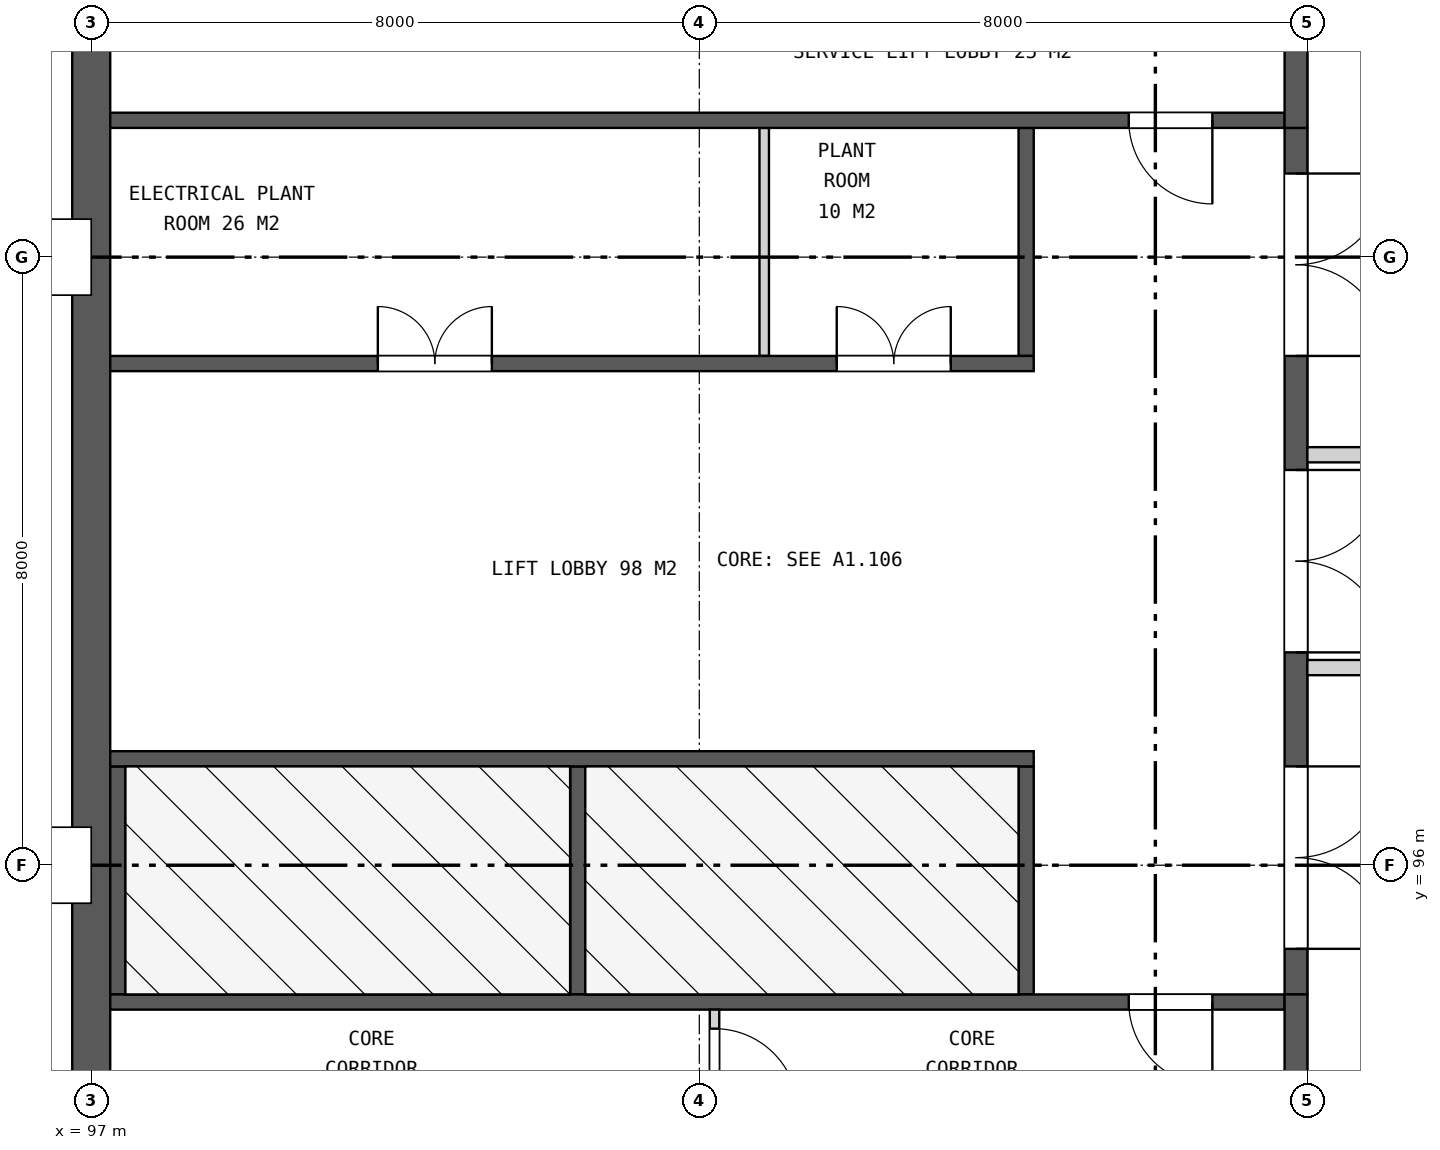
"""IFC4 building model, lengths in metres.
Left out: names, types, materials, properties, quantities, classifications, styles, units other than length and angle.
Written with IfcOpenShell. Run it as: python <this file> out.ifc"""

import sys

from ifc_helpers import new_model, si_unit, direction, frame, frame_2d, origin, place, context, subcontext, project, spatial, rectangle, extrude, element, fill, save


model = new_model("IFC4")
c1 = context("Model", 3, precision=1e-05, world=origin(), true_north=direction((0.0, 1.0)))
c2 = subcontext(c1, "Body", "Model", "MODEL_VIEW")
j1 = project(units=[si_unit("LENGTHUNIT", "METRE"), si_unit("PLANEANGLEUNIT", "RADIAN")], contexts=[c1])
p1 = place(None, origin())
s1 = spatial("IfcSite", under=j1, at=p1, CompositionType="ELEMENT")
p2 = place(p1, origin())
s2 = spatial("IfcBuilding", under=s1, at=p2, CompositionType="ELEMENT")
p3 = place(p2, frame((0.0, 0.0, 303.9)))
s3 = spatial("IfcBuildingStorey", under=s2, at=p3, CompositionType="ELEMENT", Elevation=303.9)
p4 = place(p3, frame((97.0, 111.75, 0.0), z_axis=(0.0, 0.0, 1.0), x_axis=(0.0, -1.0, 0.0)))
e1 = element("IfcWall", 1, at=p4, inside=s3, PredefinedType="SHEAR", context=c2, shape_type="SweptSolid", body=[
    extrude(rectangle(XDim=23.5, YDim=0.5, at=frame_2d((11.75, 0.0))), origin(), (0.0, 0.0, 1.0), 7.4),
])
p5 = place(p3, frame((112.85, 105.7, 0.0), z_axis=(0.0, 0.0, 1.0), x_axis=(0.0, -1.0, 0.0)))
e2 = element("IfcWall", 2, at=p5, inside=s3, PredefinedType="SHEAR", context=c2, shape_type="SweptSolid", body=[
    extrude(rectangle(XDim=11.4, YDim=0.3, at=frame_2d((5.7, 0.0))), origin(), (0.0, 0.0, 1.0), 7.4),
])
p6 = place(p5, frame((0.6, 0.0, 0.0)))
e3 = element("IfcOpeningElement", 3, at=p6, cuts=e2, PredefinedType="OPENING", context=c2, shape_type="SweptSolid", body=[
    extrude(rectangle(XDim=2.4, YDim=2.4, at=frame_2d((1.2, 1.2))), frame((0.0, 0.16, 0.0), z_axis=(0.0, -1.0, 0.0), x_axis=(1.0, 0.0, 0.0)), (0.0, 0.0, 1.0), 0.32),
])
p7 = place(p5, frame((4.5, 0.0, 0.0)))
e4 = element("IfcOpeningElement", 4, at=p7, cuts=e2, PredefinedType="OPENING", context=c2, shape_type="SweptSolid", body=[
    extrude(rectangle(XDim=2.4, YDim=2.4, at=frame_2d((1.2, 1.2))), frame((0.0, 0.16, 0.0), z_axis=(0.0, -1.0, 0.0), x_axis=(1.0, 0.0, 0.0)), (0.0, 0.0, 1.0), 0.32),
])
p8 = place(p5, frame((8.4, 0.0, 0.0)))
e5 = element("IfcOpeningElement", 5, at=p8, cuts=e2, PredefinedType="OPENING", context=c2, shape_type="SweptSolid", body=[
    extrude(rectangle(XDim=2.4, YDim=2.4, at=frame_2d((1.2, 1.2))), frame((0.0, 0.16, 0.0), z_axis=(0.0, -1.0, 0.0), x_axis=(1.0, 0.0, 0.0)), (0.0, 0.0, 1.0), 0.32),
])
for number, where, z_axis, x_axis in (
    (6, (109.3, 97.3, 0.0), (0.0, 0.0, 1.0), (0.0, -1.0, 0.0)),
    (7, (103.4, 97.3, 0.0), (0.0, 0.0, 1.0), (0.0, -1.0, 0.0)),
    (8, (97.35, 97.3, 0.0), (0.0, 0.0, 1.0), (0.0, -1.0, 0.0)),
):
    element("IfcWall", number, at=place(p3, frame(where, z_axis=z_axis, x_axis=x_axis)), inside=s3, PredefinedType="SHEAR", context=c2, shape_type="SweptSolid", body=[
        extrude(rectangle(XDim=3.0, YDim=0.2, at=frame_2d((1.5, 0.0))), origin(), (0.0, 0.0, 1.0), 7.4),
    ])
p9 = place(p3, frame((109.4, 97.4, 0.0), z_axis=(0.0, 0.0, 1.0), x_axis=(-1.0, 0.0, 0.0)))
e9 = element("IfcWall", 9, at=p9, inside=s3, PredefinedType="SHEAR", context=c2, shape_type="SweptSolid", body=[
    extrude(rectangle(XDim=12.15, YDim=0.2, at=frame_2d((6.075, 0.0))), origin(), (0.0, 0.0, 1.0), 7.4),
])
p10 = place(p3, frame((109.3, 105.7, 0.0), z_axis=(0.0, 0.0, 1.0), x_axis=(0.0, -1.0, 0.0)))
e10 = element("IfcWall", 10, at=p10, inside=s3, PredefinedType="SHEAR", context=c2, shape_type="SweptSolid", body=[
    extrude(rectangle(XDim=3.0, YDim=0.2, at=frame_2d((1.5, 0.0))), origin(), (0.0, 0.0, 1.0), 7.4),
])
p11 = place(p3, frame((105.854, 105.7, 0.0), z_axis=(0.0, 0.0, 1.0), x_axis=(0.0, -1.0, 0.0)))
e11 = element("IfcWall", 11, at=p11, inside=s3, PredefinedType="PARTITIONING", context=c2, shape_type="SweptSolid", body=[
    extrude(rectangle(XDim=3.0, YDim=0.125, at=frame_2d((1.5, 0.0))), origin(), (0.0, 0.0, 1.0), 7.4),
])
p12 = place(p3, frame((109.4, 102.6, 0.0), z_axis=(0.0, 0.0, 1.0), x_axis=(-1.0, 0.0, 0.0)))
e12 = element("IfcWall", 12, at=p12, inside=s3, PredefinedType="SHEAR", context=c2, shape_type="SweptSolid", body=[
    extrude(rectangle(XDim=12.15, YDim=0.2, at=frame_2d((6.075, 0.0))), origin(), (0.0, 0.0, 1.0), 7.4),
])
p13 = place(p12, frame((1.092, 0.0, 0.0)))
e13 = element("IfcOpeningElement", 13, at=p13, cuts=e12, PredefinedType="OPENING", context=c2, shape_type="SweptSolid", body=[
    extrude(rectangle(XDim=1.5, YDim=2.1, at=frame_2d((0.75, 1.05))), frame((0.0, 0.11, 0.0), z_axis=(0.0, -1.0, 0.0), x_axis=(1.0, 0.0, 0.0)), (0.0, 0.0, 1.0), 0.22),
])
p14 = place(p12, frame((7.129, 0.0, 0.0)))
e14 = element("IfcOpeningElement", 14, at=p14, cuts=e12, PredefinedType="OPENING", context=c2, shape_type="SweptSolid", body=[
    extrude(rectangle(XDim=1.5, YDim=2.1, at=frame_2d((0.75, 1.05))), frame((0.0, 0.11, 0.0), z_axis=(0.0, -1.0, 0.0), x_axis=(1.0, 0.0, 0.0)), (0.0, 0.0, 1.0), 0.22),
])
p15 = place(p3, frame((112.7, 94.2, 0.0), z_axis=(0.0, 0.0, 1.0), x_axis=(-1.0, 0.0, 0.0)))
e15 = element("IfcWall", 15, at=p15, inside=s3, PredefinedType="SHEAR", context=c2, shape_type="SweptSolid", body=[
    extrude(rectangle(XDim=15.45, YDim=0.2, at=frame_2d((7.725, 0.0))), origin(), (0.0, 0.0, 1.0), 7.4),
])
p16 = place(p15, frame((0.95, 0.0, 0.0)))
e16 = element("IfcOpeningElement", 16, at=p16, cuts=e15, PredefinedType="OPENING", context=c2, shape_type="SweptSolid", body=[
    extrude(rectangle(XDim=1.1, YDim=2.1, at=frame_2d((0.55, 1.05))), frame((0.0, 0.11, 0.0), z_axis=(0.0, -1.0, 0.0), x_axis=(1.0, 0.0, 0.0)), (0.0, 0.0, 1.0), 0.22),
])
p17 = place(p3, frame((112.85, 94.3, 0.0), z_axis=(0.0, 0.0, 1.0), x_axis=(0.0, -1.0, 0.0)))
e17 = element("IfcWall", 17, at=p17, inside=s3, PredefinedType="SHEAR", context=c2, shape_type="SweptSolid", body=[
    extrude(rectangle(XDim=6.05, YDim=0.3, at=frame_2d((3.025, 0.0))), origin(), (0.0, 0.0, 1.0), 7.4),
])
p18 = place(p3, frame((105.2, 94.1, 0.0), z_axis=(0.0, 0.0, 1.0), x_axis=(0.0, -1.0, 0.0)))
e18 = element("IfcWall", 18, at=p18, inside=s3, PredefinedType="PARTITIONING", context=c2, shape_type="SweptSolid", body=[
    extrude(rectangle(XDim=1.6, YDim=0.125, at=frame_2d((0.8, 0.0))), origin(), (0.0, 0.0, 1.0), 7.4),
])
p19 = place(p18, frame((0.25, 0.0, 0.0)))
e19 = element("IfcOpeningElement", 19, at=p19, cuts=e18, PredefinedType="OPENING", context=c2, shape_type="SweptSolid", body=[
    extrude(rectangle(XDim=1.1, YDim=2.1, at=frame_2d((0.55, 1.05))), frame((0.0, 0.073, 0.0), z_axis=(0.0, -1.0, 0.0), x_axis=(1.0, 0.0, 0.0)), (0.0, 0.0, 1.0), 0.145),
])
p20 = place(p3, frame((112.7, 105.8, 0.0), z_axis=(0.0, 0.0, 1.0), x_axis=(-1.0, 0.0, 0.0)))
e20 = element("IfcWall", 20, at=p20, inside=s3, PredefinedType="SHEAR", context=c2, shape_type="SweptSolid", body=[
    extrude(rectangle(XDim=15.45, YDim=0.2, at=frame_2d((7.725, 0.0))), origin(), (0.0, 0.0, 1.0), 7.4),
])
p21 = place(p20, frame((0.95, 0.0, 0.0)))
e21 = element("IfcOpeningElement", 21, at=p21, cuts=e20, PredefinedType="OPENING", context=c2, shape_type="SweptSolid", body=[
    extrude(rectangle(XDim=1.1, YDim=2.1, at=frame_2d((0.55, 1.05))), frame((0.0, 0.11, 0.0), z_axis=(0.0, -1.0, 0.0), x_axis=(1.0, 0.0, 0.0)), (0.0, 0.0, 1.0), 0.22),
])
p22 = place(p3, frame((112.85, 111.75, 0.0), z_axis=(0.0, 0.0, 1.0), x_axis=(0.0, -1.0, 0.0)))
e22 = element("IfcWall", 22, at=p22, inside=s3, PredefinedType="SHEAR", context=c2, shape_type="SweptSolid", body=[
    extrude(rectangle(XDim=6.05, YDim=0.3, at=frame_2d((3.025, 0.0))), origin(), (0.0, 0.0, 1.0), 7.4),
])
p23 = place(p3, frame((113.0, 98.6, 0.0), z_axis=(0.0, 0.0, 1.0), x_axis=(1.0, 0.0, 0.0)))
e23 = element("IfcWall", 23, at=p23, inside=s3, PredefinedType="SOLIDWALL", context=c2, shape_type="SweptSolid", body=[
    extrude(rectangle(XDim=7.9, YDim=0.2, at=frame_2d((3.95, 0.0))), origin(), (0.0, 0.0, 1.0), 6.643),
])
p24 = place(p23, frame((4.25, 0.0, 0.0)))
e24 = element("IfcOpeningElement", 24, at=p24, cuts=e23, PredefinedType="OPENING", context=c2, shape_type="SweptSolid", body=[
    extrude(rectangle(XDim=1.0, YDim=2.1, at=frame_2d((0.5, 1.05))), frame((0.0, 0.11, 0.0), z_axis=(0.0, -1.0, 0.0), x_axis=(1.0, 0.0, 0.0)), (0.0, 0.0, 1.0), 0.22),
])
p25 = place(p3, frame((113.0, 101.4, 0.0), z_axis=(0.0, 0.0, 1.0), x_axis=(1.0, 0.0, 0.0)))
e25 = element("IfcWall", 25, at=p25, inside=s3, PredefinedType="SOLIDWALL", context=c2, shape_type="SweptSolid", body=[
    extrude(rectangle(XDim=7.9, YDim=0.2, at=frame_2d((3.95, 0.0))), origin(), (0.0, 0.0, 1.0), 6.643),
])
p26 = place(p25, frame((4.25, 0.0, 0.0)))
e26 = element("IfcOpeningElement", 26, at=p26, cuts=e25, PredefinedType="OPENING", context=c2, shape_type="SweptSolid", body=[
    extrude(rectangle(XDim=1.0, YDim=2.1, at=frame_2d((0.5, 1.05))), frame((0.0, 0.11, 0.0), z_axis=(0.0, -1.0, 0.0), x_axis=(1.0, 0.0, 0.0)), (0.0, 0.0, 1.0), 0.22),
])
p27 = place(p6, origin())
e27 = element("IfcDoor", 27, at=p27, inside=s3, OperationType="DOUBLE_DOOR_SINGLE_SWING", PredefinedType="DOOR", context=c2, shape_type="SweptSolid", body=[
    extrude(rectangle(XDim=2.4, YDim=2.4, at=frame_2d((1.2, 1.2))), frame((0.0, 0.025, 0.0), z_axis=(0.0, -1.0, 0.0), x_axis=(1.0, 0.0, 0.0)), (0.0, 0.0, 1.0), 0.05),
])
fill(e3, e27)
p28 = place(p7, origin())
e28 = element("IfcDoor", 28, at=p28, inside=s3, OperationType="DOUBLE_DOOR_SINGLE_SWING", PredefinedType="DOOR", context=c2, shape_type="SweptSolid", body=[
    extrude(rectangle(XDim=2.4, YDim=2.4, at=frame_2d((1.2, 1.2))), frame((0.0, 0.025, 0.0), z_axis=(0.0, -1.0, 0.0), x_axis=(1.0, 0.0, 0.0)), (0.0, 0.0, 1.0), 0.05),
])
fill(e4, e28)
p29 = place(p8, origin())
e29 = element("IfcDoor", 29, at=p29, inside=s3, OperationType="DOUBLE_DOOR_SINGLE_SWING", PredefinedType="DOOR", context=c2, shape_type="SweptSolid", body=[
    extrude(rectangle(XDim=2.4, YDim=2.4, at=frame_2d((1.2, 1.2))), frame((0.0, 0.025, 0.0), z_axis=(0.0, -1.0, 0.0), x_axis=(1.0, 0.0, 0.0)), (0.0, 0.0, 1.0), 0.05),
])
fill(e5, e29)
p30 = place(p13, frame((1.5, 0.0, 0.0), z_axis=(0.0, 0.0, 1.0), x_axis=(-1.0, 0.0, 0.0)))
e30 = element("IfcDoor", 30, at=p30, inside=s3, OperationType="DOUBLE_DOOR_SINGLE_SWING", PredefinedType="DOOR", context=c2, shape_type="SweptSolid", body=[
    extrude(rectangle(XDim=1.5, YDim=2.1, at=frame_2d((0.75, 1.05))), frame((0.0, 0.025, 0.0), z_axis=(0.0, -1.0, 0.0), x_axis=(1.0, 0.0, 0.0)), (0.0, 0.0, 1.0), 0.05),
])
fill(e13, e30)
p31 = place(p14, frame((1.5, 0.0, 0.0), z_axis=(0.0, 0.0, 1.0), x_axis=(-1.0, 0.0, 0.0)))
e31 = element("IfcDoor", 31, at=p31, inside=s3, OperationType="DOUBLE_DOOR_SINGLE_SWING", PredefinedType="DOOR", context=c2, shape_type="SweptSolid", body=[
    extrude(rectangle(XDim=1.5, YDim=2.1, at=frame_2d((0.75, 1.05))), frame((0.0, 0.025, 0.0), z_axis=(0.0, -1.0, 0.0), x_axis=(1.0, 0.0, 0.0)), (0.0, 0.0, 1.0), 0.05),
])
fill(e14, e31)
p32 = place(p16, origin())
e32 = element("IfcDoor", 32, at=p32, inside=s3, OperationType="SINGLE_SWING_LEFT", PredefinedType="DOOR", context=c2, shape_type="SweptSolid", body=[
    extrude(rectangle(XDim=1.1, YDim=2.1, at=frame_2d((0.55, 1.05))), frame((0.0, 0.025, 0.0), z_axis=(0.0, -1.0, 0.0), x_axis=(1.0, 0.0, 0.0)), (0.0, 0.0, 1.0), 0.05),
])
fill(e16, e32)
p33 = place(p19, origin())
e33 = element("IfcDoor", 33, at=p33, inside=s3, OperationType="SINGLE_SWING_RIGHT", PredefinedType="DOOR", context=c2, shape_type="SweptSolid", body=[
    extrude(rectangle(XDim=1.1, YDim=2.1, at=frame_2d((0.55, 1.05))), frame((0.0, 0.025, 0.0), z_axis=(0.0, -1.0, 0.0), x_axis=(1.0, 0.0, 0.0)), (0.0, 0.0, 1.0), 0.05),
])
fill(e19, e33)
p34 = place(p21, origin())
e34 = element("IfcDoor", 34, at=p34, inside=s3, OperationType="SINGLE_SWING_LEFT", PredefinedType="DOOR", context=c2, shape_type="SweptSolid", body=[
    extrude(rectangle(XDim=1.1, YDim=2.1, at=frame_2d((0.55, 1.05))), frame((0.0, 0.025, 0.0), z_axis=(0.0, -1.0, 0.0), x_axis=(1.0, 0.0, 0.0)), (0.0, 0.0, 1.0), 0.05),
])
fill(e21, e34)
save(model, sys.argv[1])
